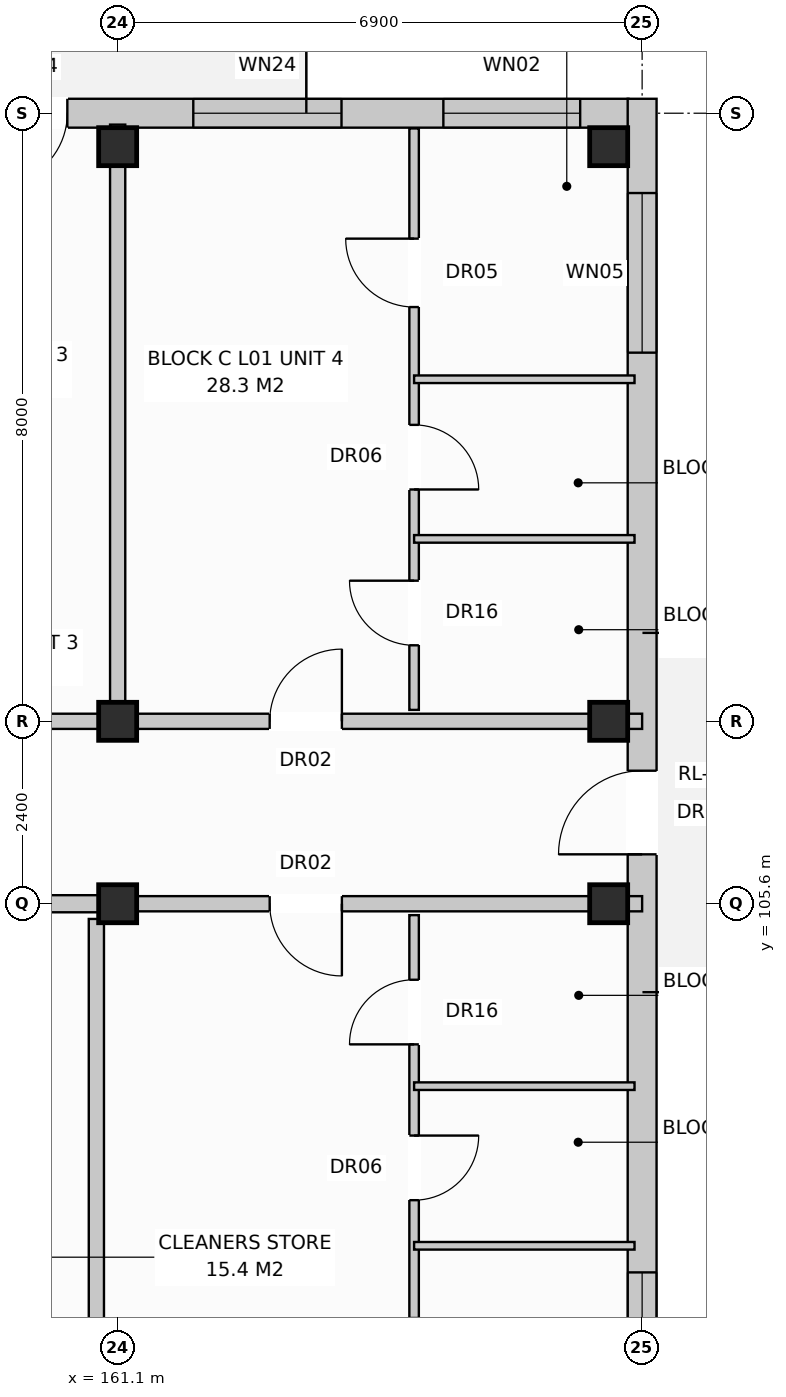
"""IFC4 building model, lengths in metres.
Left out: names, types, materials, properties, quantities, classifications, styles, units other than length and angle.
Written with IfcOpenShell. Run it as: python <this file> out.ifc"""

import sys

from ifc_helpers import new_model, si_unit, direction, frame, frame_2d, origin, origin_with_axes, origin_2d, place, context, subcontext, project, spatial, rectangle, extrude, element, fill, save


model = new_model("IFC4")
c1 = context("Model", 3, precision=1e-05, world=origin(), true_north=direction((0.0, 1.0)))
c2 = subcontext(c1, "Body", "Model", "MODEL_VIEW")
j1 = project(units=[si_unit("LENGTHUNIT", "METRE"), si_unit("PLANEANGLEUNIT", "RADIAN")], contexts=[c1])
p1 = place(None, origin())
s1 = spatial("IfcSite", under=j1, at=p1, CompositionType="ELEMENT")
p2 = place(p1, origin())
s2 = spatial("IfcBuilding", under=s1, at=p2, CompositionType="ELEMENT")
p3 = place(p2, frame((0.0, 0.0, 4.4)))
s3 = spatial("IfcBuildingStorey", under=s2, at=p3, CompositionType="ELEMENT", Elevation=4.4)
for number, where, z_axis, x_axis in (
    (1, (161.1, 105.6, 0.0), (0.0, 0.0, 1.0), (1.0, 0.0, 0.0)),
    (2, (161.1, 108.0, 0.0), (0.0, 0.0, 1.0), (1.0, 0.0, 0.0)),
    (3, (161.1, 115.56, 0.0), (0.0, 0.0, 1.0), (1.0, 0.0, 0.0)),
    (4, (167.56, 105.6, 0.0), (0.0, 0.0, 1.0), (1.0, 0.0, 0.0)),
    (5, (167.56, 108.0, 0.0), (0.0, 0.0, 1.0), (1.0, 0.0, 0.0)),
    (6, (167.56, 115.56, 0.0), (0.0, 0.0, 1.0), (1.0, 0.0, 0.0)),
):
    element("IfcColumn", number, at=place(p3, frame(where, z_axis=z_axis, x_axis=x_axis)), inside=s3, PredefinedType="COLUMN", context=c2, shape_type="SweptSolid", body=[
        extrude(rectangle(XDim=0.5, YDim=0.5, at=origin_2d()), origin(), (0.0, 0.0, 1.0), 3.6),
    ])
p4 = place(p3, frame((112.98, 116.0, 0.0), z_axis=(0.0, 0.0, 1.0), x_axis=(1.0, 0.0, 0.0)))
e7 = element("IfcWall", 7, at=p4, inside=s3, PredefinedType="STANDARD", context=c2, shape_type="SweptSolid", body=[
    extrude(rectangle(XDim=54.84, YDim=0.38, at=frame_2d((27.42, 0.0))), origin(), (0.0, 0.0, 1.0), 3.33),
])
p5 = place(p4, frame((7.39, 0.0, 0.0)))
e8 = element("IfcOpeningElement", 8, at=p5, cuts=e7, PredefinedType="OPENING", context=c2, shape_type="SweptSolid", body=[
    extrude(rectangle(XDim=0.95, YDim=2.1, at=frame_2d((0.475, 1.05))), frame((0.0, 0.202, 0.0), z_axis=(0.0, -1.0, 0.0), x_axis=(1.0, 0.0, 0.0)), (0.0, 0.0, 1.0), 0.404),
])
p6 = place(p4, frame((18.708, 0.0, 0.0)))
e9 = element("IfcOpeningElement", 9, at=p6, cuts=e7, PredefinedType="OPENING", context=c2, shape_type="SweptSolid", body=[
    extrude(rectangle(XDim=0.95, YDim=2.1, at=frame_2d((0.475, 1.05))), frame((0.0, 0.202, 0.0), z_axis=(0.0, -1.0, 0.0), x_axis=(1.0, 0.0, 0.0)), (0.0, 0.0, 1.0), 0.404),
])
p7 = place(p4, frame((32.708, 0.0, 0.0)))
e10 = element("IfcOpeningElement", 10, at=p7, cuts=e7, PredefinedType="OPENING", context=c2, shape_type="SweptSolid", body=[
    extrude(rectangle(XDim=0.95, YDim=2.1, at=frame_2d((0.475, 1.05))), frame((0.0, 0.202, 0.0), z_axis=(0.0, -1.0, 0.0), x_axis=(1.0, 0.0, 0.0)), (0.0, 0.0, 1.0), 0.404),
])
p8 = place(p4, frame((46.508, 0.0, 0.0)))
e11 = element("IfcOpeningElement", 11, at=p8, cuts=e7, PredefinedType="OPENING", context=c2, shape_type="SweptSolid", body=[
    extrude(rectangle(XDim=0.95, YDim=2.1, at=frame_2d((0.475, 1.05))), frame((0.0, 0.202, 0.0), z_axis=(0.0, -1.0, 0.0), x_axis=(1.0, 0.0, 0.0)), (0.0, 0.0, 1.0), 0.404),
])
p9 = place(p4, frame((1.515, 0.0, 0.8)))
e12 = element("IfcOpeningElement", 12, at=p9, cuts=e7, PredefinedType="OPENING", context=c2, shape_type="SweptSolid", body=[
    extrude(rectangle(XDim=1.95, YDim=1.65, at=frame_2d((0.975, 0.825))), frame((0.0, 0.202, 0.0), z_axis=(0.0, -1.0, 0.0), x_axis=(1.0, 0.0, 0.0)), (0.0, 0.0, 1.0), 0.404),
])
p10 = place(p4, frame((10.49, 0.0, 0.8)))
e13 = element("IfcOpeningElement", 13, at=p10, cuts=e7, PredefinedType="OPENING", context=c2, shape_type="SweptSolid", body=[
    extrude(rectangle(XDim=1.8, YDim=1.7, at=frame_2d((0.9, 0.85))), frame((0.0, 0.202, 0.0), z_axis=(0.0, -1.0, 0.0), x_axis=(1.0, 0.0, 0.0)), (0.0, 0.0, 1.0), 0.404),
])
p11 = place(p4, frame((15.84, 0.0, 0.8)))
e14 = element("IfcOpeningElement", 14, at=p11, cuts=e7, PredefinedType="OPENING", context=c2, shape_type="SweptSolid", body=[
    extrude(rectangle(XDim=1.9, YDim=1.85, at=frame_2d((0.95, 0.925))), frame((0.0, 0.202, 0.0), z_axis=(0.0, -1.0, 0.0), x_axis=(1.0, 0.0, 0.0)), (0.0, 0.0, 1.0), 0.404),
])
p12 = place(p4, frame((21.515, 0.0, 0.8)))
e15 = element("IfcOpeningElement", 15, at=p12, cuts=e7, PredefinedType="OPENING", context=c2, shape_type="SweptSolid", body=[
    extrude(rectangle(XDim=1.95, YDim=1.65, at=frame_2d((0.975, 0.825))), frame((0.0, 0.202, 0.0), z_axis=(0.0, -1.0, 0.0), x_axis=(1.0, 0.0, 0.0)), (0.0, 0.0, 1.0), 0.404),
])
p13 = place(p4, frame((27.99, 0.0, 0.8)))
e16 = element("IfcOpeningElement", 16, at=p13, cuts=e7, PredefinedType="OPENING", context=c2, shape_type="SweptSolid", body=[
    extrude(rectangle(XDim=1.8, YDim=1.7, at=frame_2d((0.9, 0.85))), frame((0.0, 0.202, 0.0), z_axis=(0.0, -1.0, 0.0), x_axis=(1.0, 0.0, 0.0)), (0.0, 0.0, 1.0), 0.404),
])
p14 = place(p4, frame((30.54, 0.0, 0.8)))
e17 = element("IfcOpeningElement", 17, at=p14, cuts=e7, PredefinedType="OPENING", context=c2, shape_type="SweptSolid", body=[
    extrude(rectangle(XDim=1.9, YDim=1.85, at=frame_2d((0.95, 0.925))), frame((0.0, 0.202, 0.0), z_axis=(0.0, -1.0, 0.0), x_axis=(1.0, 0.0, 0.0)), (0.0, 0.0, 1.0), 0.404),
])
p15 = place(p4, frame((35.515, 0.0, 0.8)))
e18 = element("IfcOpeningElement", 18, at=p15, cuts=e7, PredefinedType="OPENING", context=c2, shape_type="SweptSolid", body=[
    extrude(rectangle(XDim=1.95, YDim=1.65, at=frame_2d((0.975, 0.825))), frame((0.0, 0.202, 0.0), z_axis=(0.0, -1.0, 0.0), x_axis=(1.0, 0.0, 0.0)), (0.0, 0.0, 1.0), 0.404),
])
p16 = place(p4, frame((38.89, 0.0, 0.8)))
e19 = element("IfcOpeningElement", 19, at=p16, cuts=e7, PredefinedType="OPENING", context=c2, shape_type="SweptSolid", body=[
    extrude(rectangle(XDim=1.8, YDim=1.7, at=frame_2d((0.9, 0.85))), frame((0.0, 0.202, 0.0), z_axis=(0.0, -1.0, 0.0), x_axis=(1.0, 0.0, 0.0)), (0.0, 0.0, 1.0), 0.404),
])
p17 = place(p4, frame((44.34, 0.0, 0.8)))
e20 = element("IfcOpeningElement", 20, at=p17, cuts=e7, PredefinedType="OPENING", context=c2, shape_type="SweptSolid", body=[
    extrude(rectangle(XDim=1.9, YDim=1.85, at=frame_2d((0.95, 0.925))), frame((0.0, 0.202, 0.0), z_axis=(0.0, -1.0, 0.0), x_axis=(1.0, 0.0, 0.0)), (0.0, 0.0, 1.0), 0.404),
])
p18 = place(p4, frame((49.115, 0.0, 0.8)))
e21 = element("IfcOpeningElement", 21, at=p18, cuts=e7, PredefinedType="OPENING", context=c2, shape_type="SweptSolid", body=[
    extrude(rectangle(XDim=1.95, YDim=1.65, at=frame_2d((0.975, 0.825))), frame((0.0, 0.202, 0.0), z_axis=(0.0, -1.0, 0.0), x_axis=(1.0, 0.0, 0.0)), (0.0, 0.0, 1.0), 0.404),
])
p19 = place(p4, frame((52.405, 0.0, 0.8)))
e22 = element("IfcOpeningElement", 22, at=p19, cuts=e7, PredefinedType="OPENING", context=c2, shape_type="SweptSolid", body=[
    extrude(rectangle(XDim=1.8, YDim=1.7, at=frame_2d((0.9, 0.85))), frame((0.0, 0.202, 0.0), z_axis=(0.0, -1.0, 0.0), x_axis=(1.0, 0.0, 0.0)), (0.0, 0.0, 1.0), 0.404),
])
p20 = place(p3, frame((168.0, 97.41, 0.0), z_axis=(0.0, 0.0, 1.0), x_axis=(0.0, 1.0, 0.0)))
e23 = element("IfcWall", 23, at=p20, inside=s3, PredefinedType="STANDARD", context=c2, shape_type="SweptSolid", body=[
    extrude(rectangle(XDim=18.78, YDim=0.38, at=frame_2d((9.39, 0.0))), origin(), (0.0, 0.0, 1.0), 3.33),
])
p21 = place(p20, frame((8.84, 0.0, 0.0)))
e24 = element("IfcOpeningElement", 24, at=p21, cuts=e23, PredefinedType="OPENING", context=c2, shape_type="SweptSolid", body=[
    extrude(rectangle(XDim=1.1, YDim=2.1, at=frame_2d((0.55, 1.05))), frame((0.0, 0.202, 0.0), z_axis=(0.0, -1.0, 0.0), x_axis=(1.0, 0.0, 0.0)), (0.0, 0.0, 1.0), 0.404),
])
p22 = place(p20, frame((1.24, 0.0, 0.72)))
e25 = element("IfcOpeningElement", 25, at=p22, cuts=e23, PredefinedType="OPENING", context=c2, shape_type="SweptSolid", body=[
    extrude(rectangle(XDim=2.1, YDim=1.9, at=frame_2d((1.05, 0.95))), frame((0.0, 0.202, 0.0), z_axis=(0.0, -1.0, 0.0), x_axis=(1.0, 0.0, 0.0)), (0.0, 0.0, 1.0), 0.404),
])
p23 = place(p20, frame((15.44, 0.0, 0.72)))
e26 = element("IfcOpeningElement", 26, at=p23, cuts=e23, PredefinedType="OPENING", context=c2, shape_type="SweptSolid", body=[
    extrude(rectangle(XDim=2.1, YDim=1.9, at=frame_2d((1.05, 0.95))), frame((0.0, 0.202, 0.0), z_axis=(0.0, -1.0, 0.0), x_axis=(1.0, 0.0, 0.0)), (0.0, 0.0, 1.0), 0.404),
])
p24 = place(p3, frame((160.82, 97.8, 0.0), z_axis=(0.0, 0.0, 1.0), x_axis=(0.0, 1.0, 0.0)))
e27 = element("IfcWall", 27, at=p24, inside=s3, PredefinedType="PARTITIONING", context=c2, shape_type="SweptSolid", body=[
    extrude(rectangle(XDim=7.6, YDim=0.2, at=frame_2d((3.8, 0.0))), origin(), (0.0, 0.0, 1.0), 2.77),
])
p25 = place(p3, frame((151.2, 105.6, 0.0), z_axis=(0.0, 0.0, 1.0), x_axis=(1.0, 0.0, 0.0)))
e28 = element("IfcWall", 28, at=p25, inside=s3, PredefinedType="PARTITIONING", context=c2, shape_type="SweptSolid", body=[
    extrude(rectangle(XDim=9.9, YDim=0.225, at=frame_2d((4.95, 0.0))), origin(), (0.0, 0.0, 1.0), 2.77),
])
p26 = place(p25, frame((0.475, 0.0, 0.0)))
e29 = element("IfcOpeningElement", 29, at=p26, cuts=e28, PredefinedType="OPENING", context=c2, shape_type="SweptSolid", body=[
    extrude(rectangle(XDim=1.1, YDim=2.15, at=frame_2d((0.55, 1.075))), frame((0.0, 0.125, 0.0), z_axis=(0.0, -1.0, 0.0), x_axis=(1.0, 0.0, 0.0)), (0.0, 0.0, 1.0), 0.249),
])
p27 = place(p25, frame((5.75, 0.0, 0.0)))
e30 = element("IfcOpeningElement", 30, at=p27, cuts=e28, PredefinedType="OPENING", context=c2, shape_type="SweptSolid", body=[
    extrude(rectangle(XDim=0.9, YDim=2.1, at=frame_2d((0.45, 1.05))), frame((0.0, 0.125, 0.0), z_axis=(0.0, -1.0, 0.0), x_axis=(1.0, 0.0, 0.0)), (0.0, 0.0, 1.0), 0.249),
])
p28 = place(p25, frame((7.8, 0.0, 0.0)))
e31 = element("IfcOpeningElement", 31, at=p28, cuts=e28, PredefinedType="OPENING", context=c2, shape_type="SweptSolid", body=[
    extrude(rectangle(XDim=0.95, YDim=2.15, at=frame_2d((0.475, 1.075))), frame((0.0, 0.125, 0.0), z_axis=(0.0, -1.0, 0.0), x_axis=(1.0, 0.0, 0.0)), (0.0, 0.0, 1.0), 0.249),
])
p29 = place(p3, frame((161.1, 108.15, 0.0), z_axis=(0.0, 0.0, 1.0), x_axis=(0.0, 1.0, 0.0)))
e32 = element("IfcWall", 32, at=p29, inside=s3, PredefinedType="PARTITIONING", context=c2, shape_type="SweptSolid", body=[
    extrude(rectangle(XDim=7.7, YDim=0.2, at=frame_2d((3.85, 0.0))), origin(), (0.0, 0.0, 1.0), 2.77),
])
p30 = place(p3, frame((147.3, 108.0, 0.0), z_axis=(0.0, 0.0, 1.0), x_axis=(1.0, 0.0, 0.0)))
e33 = element("IfcWall", 33, at=p30, inside=s3, PredefinedType="PARTITIONING", context=c2, shape_type="SweptSolid", body=[
    extrude(rectangle(XDim=13.8, YDim=0.2, at=frame_2d((6.9, 0.0))), origin(), (0.0, 0.0, 1.0), 2.77),
])
p31 = place(p30, frame((9.6, 0.0, 0.0)))
e34 = element("IfcOpeningElement", 34, at=p31, cuts=e33, PredefinedType="OPENING", context=c2, shape_type="SweptSolid", body=[
    extrude(rectangle(XDim=0.95, YDim=2.15, at=frame_2d((0.475, 1.075))), frame((0.0, 0.112, 0.0), z_axis=(0.0, -1.0, 0.0), x_axis=(1.0, 0.0, 0.0)), (0.0, 0.0, 1.0), 0.224),
])
p32 = place(p3, frame((161.1, 108.0, 0.0), z_axis=(0.0, 0.0, 1.0), x_axis=(1.0, 0.0, 0.0)))
e35 = element("IfcWall", 35, at=p32, inside=s3, PredefinedType="PARTITIONING", context=c2, shape_type="SweptSolid", body=[
    extrude(rectangle(XDim=6.9, YDim=0.2, at=frame_2d((3.45, 0.0))), origin(), (0.0, 0.0, 1.0), 2.77),
])
p33 = place(p32, frame((2.0, 0.0, 0.0)))
e36 = element("IfcOpeningElement", 36, at=p33, cuts=e35, PredefinedType="OPENING", context=c2, shape_type="SweptSolid", body=[
    extrude(rectangle(XDim=0.95, YDim=2.15, at=frame_2d((0.475, 1.075))), frame((0.0, 0.112, 0.0), z_axis=(0.0, -1.0, 0.0), x_axis=(1.0, 0.0, 0.0)), (0.0, 0.0, 1.0), 0.224),
])
p34 = place(p3, frame((165.0, 108.15, 0.0), z_axis=(0.0, 0.0, 1.0), x_axis=(0.0, 1.0, 0.0)))
e37 = element("IfcWall", 37, at=p34, inside=s3, PredefinedType="PARTITIONING", context=c2, shape_type="SweptSolid", body=[
    extrude(rectangle(XDim=7.65, YDim=0.125, at=frame_2d((3.825, 0.0))), origin(), (0.0, 0.0, 1.0), 2.99),
])
p35 = place(p34, frame((0.85, 0.0, 0.0)))
e38 = element("IfcOpeningElement", 38, at=p35, cuts=e37, PredefinedType="OPENING", context=c2, shape_type="SweptSolid", body=[
    extrude(rectangle(XDim=0.85, YDim=2.1, at=frame_2d((0.425, 1.05))), frame((0.0, 0.074, 0.0), z_axis=(0.0, -1.0, 0.0), x_axis=(1.0, 0.0, 0.0)), (0.0, 0.0, 1.0), 0.149),
])
p36 = place(p34, frame((2.9, 0.0, 0.0)))
e39 = element("IfcOpeningElement", 39, at=p36, cuts=e37, PredefinedType="OPENING", context=c2, shape_type="SweptSolid", body=[
    extrude(rectangle(XDim=0.85, YDim=2.05, at=frame_2d((0.425, 1.025))), frame((0.0, 0.074, 0.0), z_axis=(0.0, -1.0, 0.0), x_axis=(1.0, 0.0, 0.0)), (0.0, 0.0, 1.0), 0.149),
])
p37 = place(p34, frame((5.3, 0.0, 0.0)))
e40 = element("IfcOpeningElement", 40, at=p37, cuts=e37, PredefinedType="OPENING", context=c2, shape_type="SweptSolid", body=[
    extrude(rectangle(XDim=0.9, YDim=2.1, at=frame_2d((0.45, 1.05))), frame((0.0, 0.074, 0.0), z_axis=(0.0, -1.0, 0.0), x_axis=(1.0, 0.0, 0.0)), (0.0, 0.0, 1.0), 0.149),
])
for number, where, z_axis, x_axis in (
    (41, (165.0, 110.4, 0.0), (0.0, 0.0, 1.0), (1.0, 0.0, 0.0)),
    (42, (165.0, 112.5, 0.0), (0.0, 0.0, 1.0), (1.0, 0.0, 0.0)),
):
    element("IfcWall", number, at=place(p3, frame(where, z_axis=z_axis, x_axis=x_axis)), inside=s3, PredefinedType="PARTITIONING", context=c2, shape_type="SweptSolid", body=[
        extrude(rectangle(XDim=2.9, YDim=0.1, at=frame_2d((1.45, 0.0))), origin(), (0.0, 0.0, 1.0), 3.33),
    ])
p38 = place(p3, frame((161.1, 105.6, 0.0), z_axis=(0.0, 0.0, 1.0), x_axis=(1.0, 0.0, 0.0)))
e43 = element("IfcWall", 43, at=p38, inside=s3, PredefinedType="PARTITIONING", context=c2, shape_type="SweptSolid", body=[
    extrude(rectangle(XDim=6.9, YDim=0.2, at=frame_2d((3.45, 0.0))), origin(), (0.0, 0.0, 1.0), 2.77),
])
p39 = place(p38, frame((2.0, 0.0, 0.0)))
e44 = element("IfcOpeningElement", 44, at=p39, cuts=e43, PredefinedType="OPENING", context=c2, shape_type="SweptSolid", body=[
    extrude(rectangle(XDim=0.95, YDim=2.15, at=frame_2d((0.475, 1.075))), frame((0.0, 0.112, 0.0), z_axis=(0.0, -1.0, 0.0), x_axis=(1.0, 0.0, 0.0)), (0.0, 0.0, 1.0), 0.224),
])
p40 = place(p3, frame((165.0, 105.45, 0.0), z_axis=(0.0, 0.0, 1.0), x_axis=(0.0, -1.0, 0.0)))
e45 = element("IfcWall", 45, at=p40, inside=s3, PredefinedType="PARTITIONING", context=c2, shape_type="SweptSolid", body=[
    extrude(rectangle(XDim=7.65, YDim=0.125, at=frame_2d((3.825, 0.0))), origin(), (0.0, 0.0, 1.0), 2.99),
])
p41 = place(p40, frame((0.85, 0.0, 0.0)))
e46 = element("IfcOpeningElement", 46, at=p41, cuts=e45, PredefinedType="OPENING", context=c2, shape_type="SweptSolid", body=[
    extrude(rectangle(XDim=0.85, YDim=2.1, at=frame_2d((0.425, 1.05))), frame((0.0, 0.074, 0.0), z_axis=(0.0, -1.0, 0.0), x_axis=(1.0, 0.0, 0.0)), (0.0, 0.0, 1.0), 0.149),
])
p42 = place(p40, frame((2.9, 0.0, 0.0)))
e47 = element("IfcOpeningElement", 47, at=p42, cuts=e45, PredefinedType="OPENING", context=c2, shape_type="SweptSolid", body=[
    extrude(rectangle(XDim=0.85, YDim=2.05, at=frame_2d((0.425, 1.025))), frame((0.0, 0.074, 0.0), z_axis=(0.0, -1.0, 0.0), x_axis=(1.0, 0.0, 0.0)), (0.0, 0.0, 1.0), 0.149),
])
p43 = place(p40, frame((5.3, 0.0, 0.0)))
e48 = element("IfcOpeningElement", 48, at=p43, cuts=e45, PredefinedType="OPENING", context=c2, shape_type="SweptSolid", body=[
    extrude(rectangle(XDim=0.9, YDim=2.1, at=frame_2d((0.45, 1.05))), frame((0.0, 0.074, 0.0), z_axis=(0.0, -1.0, 0.0), x_axis=(1.0, 0.0, 0.0)), (0.0, 0.0, 1.0), 0.149),
])
for number, where, z_axis, x_axis in (
    (49, (165.0, 103.2, 0.0), (0.0, 0.0, 1.0), (1.0, 0.0, 0.0)),
    (50, (165.0, 101.1, 0.0), (0.0, 0.0, 1.0), (1.0, 0.0, 0.0)),
):
    element("IfcWall", number, at=place(p3, frame(where, z_axis=z_axis, x_axis=x_axis)), inside=s3, PredefinedType="PARTITIONING", context=c2, shape_type="SweptSolid", body=[
        extrude(rectangle(XDim=2.9, YDim=0.1, at=frame_2d((1.45, 0.0))), origin(), (0.0, 0.0, 1.0), 3.33),
    ])
p44 = place(p8, frame((0.95, 0.0, 0.0), z_axis=(0.0, 0.0, 1.0), x_axis=(-1.0, 0.0, 0.0)))
e51 = element("IfcDoor", 51, at=p44, inside=s3, OperationType="SINGLE_SWING_LEFT", PredefinedType="DOOR", context=c2, shape_type="SweptSolid", body=[
    extrude(rectangle(XDim=0.95, YDim=2.1, at=frame_2d((0.475, 1.05))), frame((0.0, 0.025, 0.0), z_axis=(0.0, -1.0, 0.0), x_axis=(1.0, 0.0, 0.0)), (0.0, 0.0, 1.0), 0.05),
])
fill(e11, e51)
p45 = place(p18, origin_with_axes())
e52 = element("IfcWindow", 52, at=p45, inside=s3, PartitioningType="SINGLE_PANEL", PredefinedType="WINDOW", context=c2, shape_type="SweptSolid", body=[
    extrude(rectangle(XDim=1.95, YDim=1.65, at=frame_2d((0.975, 0.825))), frame((0.0, 0.03, 0.0), z_axis=(0.0, -1.0, 0.0), x_axis=(1.0, 0.0, 0.0)), (0.0, 0.0, 1.0), 0.06),
])
fill(e21, e52)
p46 = place(p19, origin_with_axes())
e53 = element("IfcWindow", 53, at=p46, inside=s3, PartitioningType="SINGLE_PANEL", PredefinedType="WINDOW", context=c2, shape_type="SweptSolid", body=[
    extrude(rectangle(XDim=1.8, YDim=1.7, at=frame_2d((0.9, 0.85))), frame((0.0, 0.03, 0.0), z_axis=(0.0, -1.0, 0.0), x_axis=(1.0, 0.0, 0.0)), (0.0, 0.0, 1.0), 0.06),
])
fill(e22, e53)
p47 = place(p21, origin_with_axes())
e54 = element("IfcDoor", 54, at=p47, inside=s3, OperationType="SINGLE_SWING_LEFT", PredefinedType="DOOR", context=c2, shape_type="SweptSolid", body=[
    extrude(rectangle(XDim=1.1, YDim=2.1, at=frame_2d((0.55, 1.05))), frame((0.0, 0.025, 0.0), z_axis=(0.0, -1.0, 0.0), x_axis=(1.0, 0.0, 0.0)), (0.0, 0.0, 1.0), 0.05),
])
fill(e24, e54)
p48 = place(p22, origin_with_axes())
e55 = element("IfcWindow", 55, at=p48, inside=s3, PartitioningType="SINGLE_PANEL", PredefinedType="WINDOW", context=c2, shape_type="SweptSolid", body=[
    extrude(rectangle(XDim=2.1, YDim=1.9, at=frame_2d((1.05, 0.95))), frame((0.0, 0.03, 0.0), z_axis=(0.0, -1.0, 0.0), x_axis=(1.0, 0.0, 0.0)), (0.0, 0.0, 1.0), 0.06),
])
fill(e25, e55)
p49 = place(p23, origin_with_axes())
e56 = element("IfcWindow", 56, at=p49, inside=s3, PartitioningType="SINGLE_PANEL", PredefinedType="WINDOW", context=c2, shape_type="SweptSolid", body=[
    extrude(rectangle(XDim=2.1, YDim=1.9, at=frame_2d((1.05, 0.95))), frame((0.0, 0.03, 0.0), z_axis=(0.0, -1.0, 0.0), x_axis=(1.0, 0.0, 0.0)), (0.0, 0.0, 1.0), 0.06),
])
fill(e26, e56)
p50 = place(p33, origin_with_axes())
e57 = element("IfcDoor", 57, at=p50, inside=s3, OperationType="SINGLE_SWING_RIGHT", PredefinedType="DOOR", context=c2, shape_type="SweptSolid", body=[
    extrude(rectangle(XDim=0.95, YDim=2.15, at=frame_2d((0.475, 1.075))), frame((0.0, 0.025, 0.0), z_axis=(0.0, -1.0, 0.0), x_axis=(1.0, 0.0, 0.0)), (0.0, 0.0, 1.0), 0.05),
])
fill(e36, e57)
p51 = place(p35, origin_with_axes())
e58 = element("IfcDoor", 58, at=p51, inside=s3, OperationType="SINGLE_SWING_RIGHT", PredefinedType="DOOR", context=c2, shape_type="SweptSolid", body=[
    extrude(rectangle(XDim=0.85, YDim=2.1, at=frame_2d((0.425, 1.05))), frame((0.0, 0.025, 0.0), z_axis=(0.0, -1.0, 0.0), x_axis=(1.0, 0.0, 0.0)), (0.0, 0.0, 1.0), 0.05),
])
fill(e38, e58)
p52 = place(p36, frame((0.85, 0.0, 0.0), z_axis=(0.0, 0.0, 1.0), x_axis=(-1.0, 0.0, 0.0)))
e59 = element("IfcDoor", 59, at=p52, inside=s3, OperationType="SINGLE_SWING_LEFT", PredefinedType="DOOR", context=c2, shape_type="SweptSolid", body=[
    extrude(rectangle(XDim=0.85, YDim=2.05, at=frame_2d((0.425, 1.025))), frame((0.0, 0.025, 0.0), z_axis=(0.0, -1.0, 0.0), x_axis=(1.0, 0.0, 0.0)), (0.0, 0.0, 1.0), 0.05),
])
fill(e39, e59)
p53 = place(p37, origin_with_axes())
e60 = element("IfcDoor", 60, at=p53, inside=s3, OperationType="SINGLE_SWING_RIGHT", PredefinedType="DOOR", context=c2, shape_type="SweptSolid", body=[
    extrude(rectangle(XDim=0.9, YDim=2.1, at=frame_2d((0.45, 1.05))), frame((0.0, 0.025, 0.0), z_axis=(0.0, -1.0, 0.0), x_axis=(1.0, 0.0, 0.0)), (0.0, 0.0, 1.0), 0.05),
])
fill(e40, e60)
p54 = place(p39, frame((0.95, 0.0, 0.0), z_axis=(0.0, 0.0, 1.0), x_axis=(-1.0, 0.0, 0.0)))
e61 = element("IfcDoor", 61, at=p54, inside=s3, OperationType="SINGLE_SWING_RIGHT", PredefinedType="DOOR", context=c2, shape_type="SweptSolid", body=[
    extrude(rectangle(XDim=0.95, YDim=2.15, at=frame_2d((0.475, 1.075))), frame((0.0, 0.025, 0.0), z_axis=(0.0, -1.0, 0.0), x_axis=(1.0, 0.0, 0.0)), (0.0, 0.0, 1.0), 0.05),
])
fill(e44, e61)
p55 = place(p41, frame((0.85, 0.0, 0.0), z_axis=(0.0, 0.0, 1.0), x_axis=(-1.0, 0.0, 0.0)))
e62 = element("IfcDoor", 62, at=p55, inside=s3, OperationType="SINGLE_SWING_RIGHT", PredefinedType="DOOR", context=c2, shape_type="SweptSolid", body=[
    extrude(rectangle(XDim=0.85, YDim=2.1, at=frame_2d((0.425, 1.05))), frame((0.0, 0.025, 0.0), z_axis=(0.0, -1.0, 0.0), x_axis=(1.0, 0.0, 0.0)), (0.0, 0.0, 1.0), 0.05),
])
fill(e46, e62)
p56 = place(p42, origin_with_axes())
e63 = element("IfcDoor", 63, at=p56, inside=s3, OperationType="SINGLE_SWING_LEFT", PredefinedType="DOOR", context=c2, shape_type="SweptSolid", body=[
    extrude(rectangle(XDim=0.85, YDim=2.05, at=frame_2d((0.425, 1.025))), frame((0.0, 0.025, 0.0), z_axis=(0.0, -1.0, 0.0), x_axis=(1.0, 0.0, 0.0)), (0.0, 0.0, 1.0), 0.05),
])
fill(e47, e63)
save(model, sys.argv[1])
